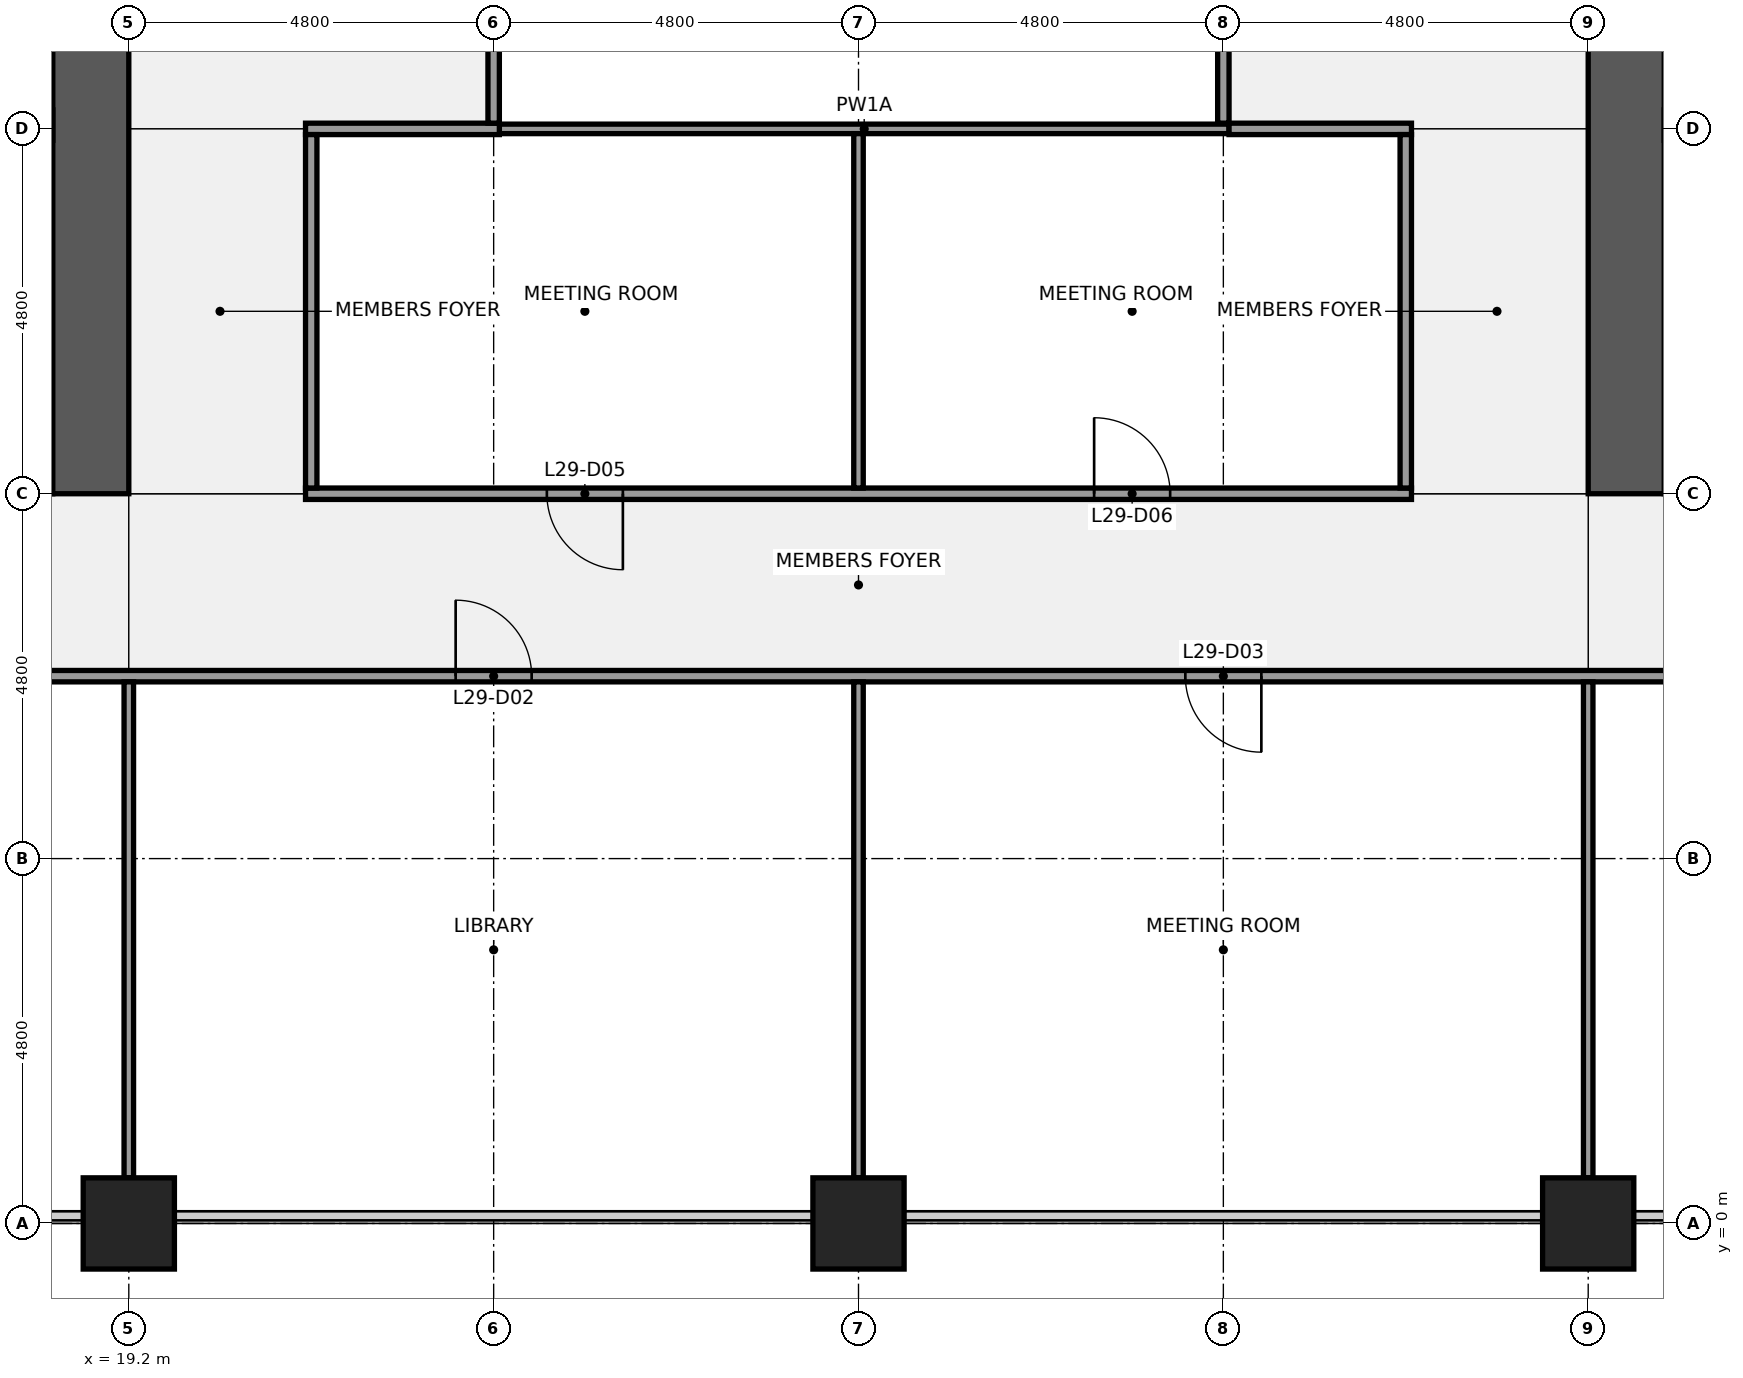
"""IFC4 building model, lengths in metres.
Left out: names, types, materials, properties, quantities, classifications, styles, units other than length and angle.
Written with IfcOpenShell. Run it as: python <this file> out.ifc"""

import sys

from ifc_helpers import new_model, si_unit, direction, frame, frame_2d, origin, origin_2d, place, context, subcontext, project, spatial, rectangle, extrude, element, fill, save


model = new_model("IFC4")
c1 = context("Model", 3, precision=1e-05, world=origin(), true_north=direction((0.0, 1.0)))
c2 = subcontext(c1, "Body", "Model", "MODEL_VIEW")
j1 = project(units=[si_unit("LENGTHUNIT", "METRE"), si_unit("PLANEANGLEUNIT", "RADIAN")], contexts=[c1])
p1 = place(None, origin())
s1 = spatial("IfcSite", under=j1, at=p1, CompositionType="ELEMENT")
p2 = place(p1, origin())
s2 = spatial("IfcBuilding", under=s1, at=p2, CompositionType="ELEMENT")
p3 = place(p2, frame((0.0, 0.0, 136.1)))
s3 = spatial("IfcBuildingStorey", under=s2, at=p3, CompositionType="ELEMENT", Elevation=136.1)
for number, where, z_axis, x_axis in (
    (1, (19.2, 0.0, 0.0), (0.0, 0.0, 1.0), (1.0, 0.0, 0.0)),
    (2, (28.8, 0.0, 0.0), (0.0, 0.0, 1.0), (1.0, 0.0, 0.0)),
    (3, (38.4, 0.0, 0.0), (0.0, 0.0, 1.0), (1.0, 0.0, 0.0)),
):
    element("IfcColumn", number, at=place(p3, frame(where, z_axis=z_axis, x_axis=x_axis)), inside=s3, PredefinedType="COLUMN", context=c2, shape_type="SweptSolid", body=[
        extrude(rectangle(XDim=1.2, YDim=1.2, at=origin_2d()), origin(), (0.0, 0.0, 1.0), 4.0),
    ])
p4 = place(p3, frame((18.2, 10.1, 0.0), z_axis=(0.0, 0.0, 1.0), x_axis=(-1.0, 0.0, 0.0)))
e4 = element("IfcWall", 4, at=p4, inside=s3, PredefinedType="SHEAR", context=c2, shape_type="SweptSolid", body=[
    extrude(rectangle(XDim=8.6, YDim=1.0, at=frame_2d((4.3, 0.0))), origin(), (0.0, 0.0, 1.0), 3.84),
])
p5 = place(p4, frame((0.85, 0.0, 0.0)))
e5 = element("IfcOpeningElement", 5, at=p5, cuts=e4, PredefinedType="OPENING", context=c2, shape_type="SweptSolid", body=[
    extrude(rectangle(XDim=1.1, YDim=2.1, at=frame_2d((0.55, 1.05))), frame((0.0, 0.51, 0.0), z_axis=(0.0, -1.0, 0.0), x_axis=(1.0, 0.0, 0.0)), (0.0, 0.0, 1.0), 1.02),
])
p6 = place(p3, frame((18.7, 38.4, 0.0), z_axis=(0.0, 0.0, 1.0), x_axis=(0.0, -1.0, 0.0)))
e6 = element("IfcWall", 6, at=p6, inside=s3, PredefinedType="SHEAR", context=c2, shape_type="SweptSolid", body=[
    extrude(rectangle(XDim=28.8, YDim=1.0, at=frame_2d((14.4, 0.0))), origin(), (0.0, 0.0, 1.0), 3.84),
])
p7 = place(p6, frame((18.3, 0.0, 0.0)))
e7 = element("IfcOpeningElement", 7, at=p7, cuts=e6, PredefinedType="OPENING", context=c2, shape_type="SweptSolid", body=[
    extrude(rectangle(XDim=1.8, YDim=2.1, at=frame_2d((0.9, 1.05))), frame((0.0, 0.51, 0.0), z_axis=(0.0, -1.0, 0.0), x_axis=(1.0, 0.0, 0.0)), (0.0, 0.0, 1.0), 1.02),
])
p8 = place(p6, frame((8.7, 0.0, 0.0)))
e8 = element("IfcOpeningElement", 8, at=p8, cuts=e6, PredefinedType="OPENING", context=c2, shape_type="SweptSolid", body=[
    extrude(rectangle(XDim=1.8, YDim=2.1, at=frame_2d((0.9, 1.05))), frame((0.0, 0.51, 0.0), z_axis=(0.0, -1.0, 0.0), x_axis=(1.0, 0.0, 0.0)), (0.0, 0.0, 1.0), 1.02),
])
p9 = place(p3, frame((1.0, 14.45, 0.0), z_axis=(0.0, 0.0, 1.0), x_axis=(1.0, 0.0, 0.0)))
e9 = element("IfcWall", 9, at=p9, inside=s3, PredefinedType="SHEAR", context=c2, shape_type="SweptSolid", body=[
    extrude(rectangle(XDim=17.2, YDim=0.4, at=frame_2d((8.6, 0.0))), origin(), (0.0, 0.0, 1.0), 3.84),
])
p10 = place(p3, frame((38.9, 9.6, 0.0), z_axis=(0.0, 0.0, 1.0), x_axis=(0.0, 1.0, 0.0)))
e10 = element("IfcWall", 10, at=p10, inside=s3, PredefinedType="SHEAR", context=c2, shape_type="SweptSolid", body=[
    extrude(rectangle(XDim=28.8, YDim=1.0, at=frame_2d((14.4, 0.0))), origin(), (0.0, 0.0, 1.0), 3.84),
])
p11 = place(p10, frame((8.7, 0.0, 0.0)))
e11 = element("IfcOpeningElement", 11, at=p11, cuts=e10, PredefinedType="OPENING", context=c2, shape_type="SweptSolid", body=[
    extrude(rectangle(XDim=1.8, YDim=2.1, at=frame_2d((0.9, 1.05))), frame((0.0, 0.51, 0.0), z_axis=(0.0, -1.0, 0.0), x_axis=(1.0, 0.0, 0.0)), (0.0, 0.0, 1.0), 1.02),
])
p12 = place(p10, frame((18.3, 0.0, 0.0)))
e12 = element("IfcOpeningElement", 12, at=p12, cuts=e10, PredefinedType="OPENING", context=c2, shape_type="SweptSolid", body=[
    extrude(rectangle(XDim=1.8, YDim=2.1, at=frame_2d((0.9, 1.05))), frame((0.0, 0.51, 0.0), z_axis=(0.0, -1.0, 0.0), x_axis=(1.0, 0.0, 0.0)), (0.0, 0.0, 1.0), 1.02),
])
p13 = place(p3, frame((9.7, 7.2, 0.0), z_axis=(0.0, 0.0, 1.0), x_axis=(1.0, 0.0, 0.0)))
e13 = element("IfcWall", 13, at=p13, inside=s3, PredefinedType="PARTITIONING", context=c2, shape_type="SweptSolid", body=[
    extrude(rectangle(XDim=38.2, YDim=0.15, at=frame_2d((19.1, 0.0))), origin(), (0.0, 0.0, 1.0), 2.849),
])
p14 = place(p13, frame((0.65, 0.0, 0.0)))
e14 = element("IfcOpeningElement", 14, at=p14, cuts=e13, PredefinedType="OPENING", context=c2, shape_type="SweptSolid", body=[
    extrude(rectangle(XDim=1.0, YDim=2.1, at=frame_2d((0.5, 1.05))), frame((0.0, 0.085, 0.0), z_axis=(0.0, -1.0, 0.0), x_axis=(1.0, 0.0, 0.0)), (0.0, 0.0, 1.0), 0.17),
])
p15 = place(p13, frame((13.8, 0.0, 0.0)))
e15 = element("IfcOpeningElement", 15, at=p15, cuts=e13, PredefinedType="OPENING", context=c2, shape_type="SweptSolid", body=[
    extrude(rectangle(XDim=1.0, YDim=2.1, at=frame_2d((0.5, 1.05))), frame((0.0, 0.085, 0.0), z_axis=(0.0, -1.0, 0.0), x_axis=(1.0, 0.0, 0.0)), (0.0, 0.0, 1.0), 0.17),
])
p16 = place(p13, frame((23.4, 0.0, 0.0)))
e16 = element("IfcOpeningElement", 16, at=p16, cuts=e13, PredefinedType="OPENING", context=c2, shape_type="SweptSolid", body=[
    extrude(rectangle(XDim=1.0, YDim=2.1, at=frame_2d((0.5, 1.05))), frame((0.0, 0.085, 0.0), z_axis=(0.0, -1.0, 0.0), x_axis=(1.0, 0.0, 0.0)), (0.0, 0.0, 1.0), 0.17),
])
p17 = place(p13, frame((32.95, 0.0, 0.0)))
e17 = element("IfcOpeningElement", 17, at=p17, cuts=e13, PredefinedType="OPENING", context=c2, shape_type="SweptSolid", body=[
    extrude(rectangle(XDim=1.0, YDim=2.1, at=frame_2d((0.5, 1.05))), frame((0.0, 0.085, 0.0), z_axis=(0.0, -1.0, 0.0), x_axis=(1.0, 0.0, 0.0)), (0.0, 0.0, 1.0), 0.17),
])
p18 = place(p3, frame((21.525, 9.6, 0.0), z_axis=(0.0, 0.0, 1.0), x_axis=(1.0, 0.0, 0.0)))
e18 = element("IfcWall", 18, at=p18, inside=s3, PredefinedType="PARTITIONING", context=c2, shape_type="SweptSolid", body=[
    extrude(rectangle(XDim=14.55, YDim=0.15, at=frame_2d((7.275, 0.0))), origin(), (0.0, 0.0, 1.0), 2.849),
])
p19 = place(p18, frame((3.175, 0.0, 0.0)))
e19 = element("IfcOpeningElement", 19, at=p19, cuts=e18, PredefinedType="OPENING", context=c2, shape_type="SweptSolid", body=[
    extrude(rectangle(XDim=1.0, YDim=2.1, at=frame_2d((0.5, 1.05))), frame((0.0, 0.085, 0.0), z_axis=(0.0, -1.0, 0.0), x_axis=(1.0, 0.0, 0.0)), (0.0, 0.0, 1.0), 0.17),
])
p20 = place(p18, frame((10.375, 0.0, 0.0)))
e20 = element("IfcOpeningElement", 20, at=p20, cuts=e18, PredefinedType="OPENING", context=c2, shape_type="SweptSolid", body=[
    extrude(rectangle(XDim=1.0, YDim=2.1, at=frame_2d((0.5, 1.05))), frame((0.0, 0.085, 0.0), z_axis=(0.0, -1.0, 0.0), x_axis=(1.0, 0.0, 0.0)), (0.0, 0.0, 1.0), 0.17),
])
p21 = place(p3, frame((24.075, 14.4, 0.0), z_axis=(0.0, 0.0, 1.0), x_axis=(1.0, 0.0, 0.0)))
e21 = element("IfcWall", 21, at=p21, inside=s3, PredefinedType="PARTITIONING", context=c2, shape_type="SweptSolid", body=[
    extrude(rectangle(XDim=9.6, YDim=0.125, at=frame_2d((4.8, 0.0))), origin(), (0.0, 0.0, 1.0), 2.849),
])
p22 = place(p3, frame((21.525, 14.4, 0.0), z_axis=(0.0, 0.0, 1.0), x_axis=(1.0, 0.0, 0.0)))
e22 = element("IfcWall", 22, at=p22, inside=s3, PredefinedType="PARTITIONING", context=c2, shape_type="SweptSolid", body=[
    extrude(rectangle(XDim=2.55, YDim=0.15, at=frame_2d((1.275, 0.0))), origin(), (0.0, 0.0, 1.0), 2.849),
])
p23 = place(p3, frame((33.675, 14.4, 0.0), z_axis=(0.0, 0.0, 1.0), x_axis=(1.0, 0.0, 0.0)))
e23 = element("IfcWall", 23, at=p23, inside=s3, PredefinedType="PARTITIONING", context=c2, shape_type="SweptSolid", body=[
    extrude(rectangle(XDim=2.4, YDim=0.15, at=frame_2d((1.2, 0.0))), origin(), (0.0, 0.0, 1.0), 2.849),
])
p24 = place(p3, frame((19.2, 0.6, 0.0), z_axis=(0.0, 0.0, 1.0), x_axis=(0.0, 1.0, 0.0)))
e24 = element("IfcWall", 24, at=p24, inside=s3, PredefinedType="PARTITIONING", context=c2, shape_type="SweptSolid", body=[
    extrude(rectangle(XDim=6.525, YDim=0.125, at=frame_2d((3.262, 0.0))), origin(), (0.0, 0.0, 1.0), 2.849),
])
p25 = place(p3, frame((21.6, 9.675, 0.0), z_axis=(0.0, 0.0, 1.0), x_axis=(0.0, 1.0, 0.0)))
e25 = element("IfcWall", 25, at=p25, inside=s3, PredefinedType="PARTITIONING", context=c2, shape_type="SweptSolid", body=[
    extrude(rectangle(XDim=4.65, YDim=0.15, at=frame_2d((2.325, 0.0))), origin(), (0.0, 0.0, 1.0), 2.849),
])
p26 = place(p3, frame((24.0, 14.475, 0.0), z_axis=(0.0, 0.0, 1.0), x_axis=(0.0, 1.0, 0.0)))
e26 = element("IfcWall", 26, at=p26, inside=s3, PredefinedType="PARTITIONING", context=c2, shape_type="SweptSolid", body=[
    extrude(rectangle(XDim=10.65, YDim=0.15, at=frame_2d((5.325, 0.0))), origin(), (0.0, 0.0, 1.0), 2.849),
])
p27 = place(p26, frame((4.825, 0.0, 0.0)))
e27 = element("IfcOpeningElement", 27, at=p27, cuts=e26, PredefinedType="OPENING", context=c2, shape_type="SweptSolid", body=[
    extrude(rectangle(XDim=1.0, YDim=2.1, at=frame_2d((0.5, 1.05))), frame((0.0, 0.085, 0.0), z_axis=(0.0, -1.0, 0.0), x_axis=(1.0, 0.0, 0.0)), (0.0, 0.0, 1.0), 0.17),
])
p28 = place(p3, frame((28.8, 0.6, 0.0), z_axis=(0.0, 0.0, 1.0), x_axis=(0.0, 1.0, 0.0)))
e28 = element("IfcWall", 28, at=p28, inside=s3, PredefinedType="PARTITIONING", context=c2, shape_type="SweptSolid", body=[
    extrude(rectangle(XDim=6.525, YDim=0.125, at=frame_2d((3.262, 0.0))), origin(), (0.0, 0.0, 1.0), 2.849),
])
p29 = place(p3, frame((28.8, 9.675, 0.0), z_axis=(0.0, 0.0, 1.0), x_axis=(0.0, 1.0, 0.0)))
e29 = element("IfcWall", 29, at=p29, inside=s3, PredefinedType="PARTITIONING", context=c2, shape_type="SweptSolid", body=[
    extrude(rectangle(XDim=4.662, YDim=0.125, at=frame_2d((2.331, 0.0))), origin(), (0.0, 0.0, 1.0), 2.849),
])
p30 = place(p3, frame((33.6, 14.475, 0.0), z_axis=(0.0, 0.0, 1.0), x_axis=(0.0, 1.0, 0.0)))
e30 = element("IfcWall", 30, at=p30, inside=s3, PredefinedType="PARTITIONING", context=c2, shape_type="SweptSolid", body=[
    extrude(rectangle(XDim=10.65, YDim=0.15, at=frame_2d((5.325, 0.0))), origin(), (0.0, 0.0, 1.0), 2.849),
])
p31 = place(p3, frame((36.0, 9.675, 0.0), z_axis=(0.0, 0.0, 1.0), x_axis=(0.0, 1.0, 0.0)))
e31 = element("IfcWall", 31, at=p31, inside=s3, PredefinedType="PARTITIONING", context=c2, shape_type="SweptSolid", body=[
    extrude(rectangle(XDim=4.65, YDim=0.15, at=frame_2d((2.325, 0.0))), origin(), (0.0, 0.0, 1.0), 2.849),
])
p32 = place(p3, frame((38.4, 0.6, 0.0), z_axis=(0.0, 0.0, 1.0), x_axis=(0.0, 1.0, 0.0)))
e32 = element("IfcWall", 32, at=p32, inside=s3, PredefinedType="PARTITIONING", context=c2, shape_type="SweptSolid", body=[
    extrude(rectangle(XDim=6.525, YDim=0.125, at=frame_2d((3.262, 0.0))), origin(), (0.0, 0.0, 1.0), 2.849),
])
for number, where, z_axis, x_axis in (
    (33, (19.2, -1.05, 0.0), (0.0, 0.0, 1.0), (1.0, 0.0, 0.0)),
    (34, (38.4, -1.05, 0.0), (0.0, 0.0, 1.0), (1.0, 0.0, 0.0)),
):
    element("IfcColumn", number, at=place(p3, frame(where, z_axis=z_axis, x_axis=x_axis)), inside=s3, PredefinedType="PILASTER", context=c2, shape_type="SweptSolid", body=[
        extrude(rectangle(XDim=3.6, YDim=0.9, at=origin_2d()), origin(), (0.0, 0.0, 1.0), 4.0),
    ])
p33 = place(p15, origin())
e35 = element("IfcDoor", 35, at=p33, inside=s3, OperationType="SINGLE_SWING_LEFT", PredefinedType="DOOR", context=c2, shape_type="SweptSolid", body=[
    extrude(rectangle(XDim=1.0, YDim=2.1, at=frame_2d((0.5, 1.05))), frame((0.0, 0.025, 0.0), z_axis=(0.0, -1.0, 0.0), x_axis=(1.0, 0.0, 0.0)), (0.0, 0.0, 1.0), 0.05),
])
fill(e15, e35)
p34 = place(p16, origin())
e36 = element("IfcDoor", 36, at=p34, inside=s3, OperationType="SINGLE_SWING_RIGHT", PredefinedType="DOOR", context=c2, shape_type="SweptSolid", body=[
    extrude(rectangle(XDim=1.0, YDim=2.1, at=frame_2d((0.5, 1.05))), frame((0.0, 0.025, 0.0), z_axis=(0.0, -1.0, 0.0), x_axis=(1.0, 0.0, 0.0)), (0.0, 0.0, 1.0), 0.05),
])
fill(e16, e36)
p35 = place(p19, origin())
e37 = element("IfcDoor", 37, at=p35, inside=s3, OperationType="SINGLE_SWING_RIGHT", PredefinedType="DOOR", context=c2, shape_type="SweptSolid", body=[
    extrude(rectangle(XDim=1.0, YDim=2.1, at=frame_2d((0.5, 1.05))), frame((0.0, 0.025, 0.0), z_axis=(0.0, -1.0, 0.0), x_axis=(1.0, 0.0, 0.0)), (0.0, 0.0, 1.0), 0.05),
])
fill(e19, e37)
p36 = place(p20, origin())
e38 = element("IfcDoor", 38, at=p36, inside=s3, OperationType="SINGLE_SWING_LEFT", PredefinedType="DOOR", context=c2, shape_type="SweptSolid", body=[
    extrude(rectangle(XDim=1.0, YDim=2.1, at=frame_2d((0.5, 1.05))), frame((0.0, 0.025, 0.0), z_axis=(0.0, -1.0, 0.0), x_axis=(1.0, 0.0, 0.0)), (0.0, 0.0, 1.0), 0.05),
])
fill(e20, e38)
save(model, sys.argv[1])
